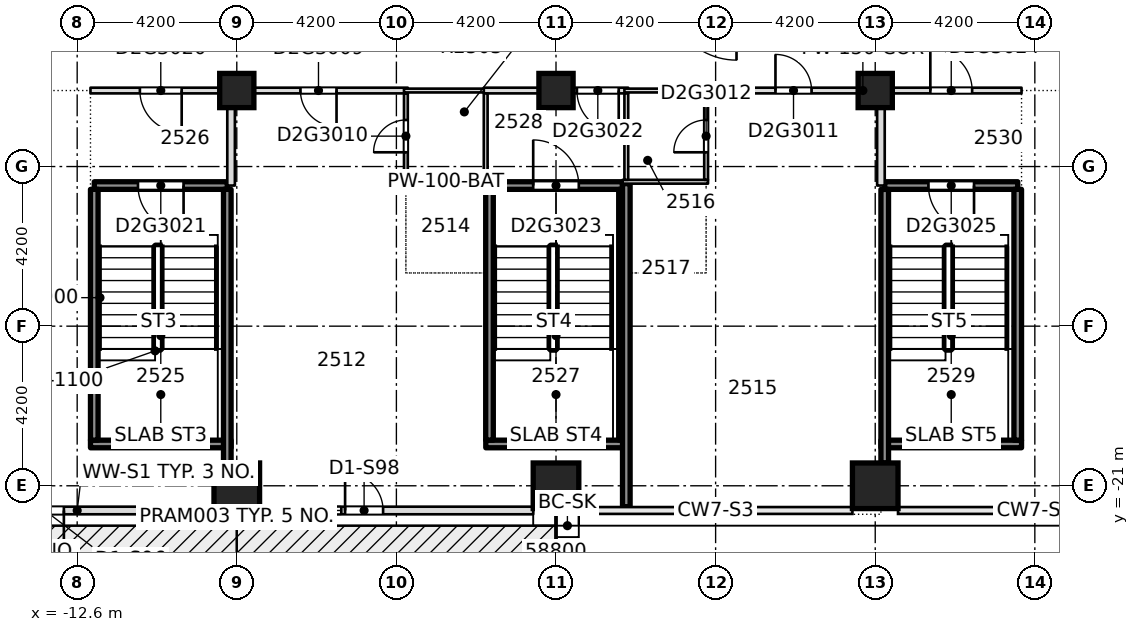
"""IFC4 building model, lengths in metres.
Left out: names, types, materials, properties, quantities, classifications, styles, units other than length and angle.
Written with IfcOpenShell. Run it as: python <this file> out.ifc"""

import sys

from ifc_helpers import new_model, si_unit, direction, frame, frame_2d, origin, origin_2d, place, context, subcontext, project, spatial, rectangle, extrude, element, fill, save


model = new_model("IFC4")
c1 = context("Model", 3, precision=1e-05, world=origin(), true_north=direction((0.0, 1.0)))
c2 = subcontext(c1, "Body", "Model", "MODEL_VIEW")
j1 = project(units=[si_unit("LENGTHUNIT", "METRE"), si_unit("PLANEANGLEUNIT", "RADIAN")], contexts=[c1])
p1 = place(None, origin())
s1 = spatial("IfcSite", under=j1, at=p1, CompositionType="ELEMENT")
p2 = place(p1, origin())
s2 = spatial("IfcBuilding", under=s1, at=p2, CompositionType="ELEMENT")
p3 = place(p2, frame((0.0, 0.0, 101.1)))
s3 = spatial("IfcBuildingStorey", under=s2, at=p3, CompositionType="ELEMENT", Elevation=101.1)
for number, where, z_axis, x_axis in (
    (1, (-8.4, -21.0, -0.32), (0.0, 0.0, 1.0), (1.0, 0.0, 0.0)),
    (2, (0.0, -21.0, -0.32), (0.0, 0.0, 1.0), (1.0, 0.0, 0.0)),
    (3, (8.4, -21.0, -0.32), (0.0, 0.0, 1.0), (1.0, 0.0, 0.0)),
):
    element("IfcColumn", number, at=place(p3, frame(where, z_axis=z_axis, x_axis=x_axis)), inside=s3, PredefinedType="COLUMN", context=c2, shape_type="SweptSolid", body=[
        extrude(rectangle(XDim=1.2, YDim=1.2, at=origin_2d()), origin(), (0.0, 0.0, 1.0), 3.45),
    ])
for number, where, z_axis, x_axis in (
    (4, (-8.4, -10.6, -0.32), (0.0, 0.0, 1.0), (1.0, 0.0, 0.0)),
    (5, (0.0, -10.6, -0.32), (0.0, 0.0, 1.0), (1.0, 0.0, 0.0)),
    (6, (8.4, -10.6, -0.32), (0.0, 0.0, 1.0), (1.0, 0.0, 0.0)),
):
    element("IfcColumn", number, at=place(p3, frame(where, z_axis=z_axis, x_axis=x_axis)), inside=s3, PredefinedType="COLUMN", context=c2, shape_type="SweptSolid", body=[
        extrude(rectangle(XDim=0.9, YDim=0.9, at=origin_2d()), origin(), (0.0, 0.0, 1.0), 3.45),
    ])
p4 = place(p3, frame((-1.848, -19.9, 0.0), z_axis=(0.0, 0.0, 1.0), x_axis=(1.0, 0.0, 0.0)))
e7 = element("IfcWall", 7, at=p4, inside=s3, PredefinedType="SOLIDWALL", context=c2, shape_type="SweptSolid", body=[
    extrude(rectangle(XDim=3.696, YDim=0.2, at=frame_2d((1.848, 0.0))), origin(), (0.0, 0.0, 1.0), 3.13),
])
p5 = place(p3, frame((-12.15, -13.1, 0.0), z_axis=(0.0, 0.0, 1.0), x_axis=(1.0, 0.0, 0.0)))
e8 = element("IfcWall", 8, at=p5, inside=s3, PredefinedType="SOLIDWALL", context=c2, shape_type="SweptSolid", body=[
    extrude(rectangle(XDim=3.5, YDim=0.2, at=frame_2d((1.75, 0.0))), origin(), (0.0, 0.0, 1.0), 3.13),
])
p6 = place(p5, frame((1.15, 0.0, 0.0)))
e9 = element("IfcOpeningElement", 9, at=p6, cuts=e8, PredefinedType="OPENING", context=c2, shape_type="SweptSolid", body=[
    extrude(rectangle(XDim=1.2, YDim=2.1, at=frame_2d((0.6, 1.05))), frame((0.0, 0.11, 0.0), z_axis=(0.0, -1.0, 0.0), x_axis=(1.0, 0.0, 0.0)), (0.0, 0.0, 1.0), 0.22),
])
p7 = place(p3, frame((-1.848, -13.1, 0.0), z_axis=(0.0, 0.0, 1.0), x_axis=(1.0, 0.0, 0.0)))
e10 = element("IfcWall", 10, at=p7, inside=s3, PredefinedType="SOLIDWALL", context=c2, shape_type="SweptSolid", body=[
    extrude(rectangle(XDim=3.596, YDim=0.2, at=frame_2d((1.798, 0.0))), origin(), (0.0, 0.0, 1.0), 3.13),
])
p8 = place(p7, frame((1.248, 0.0, 0.0)))
e11 = element("IfcOpeningElement", 11, at=p8, cuts=e10, PredefinedType="OPENING", context=c2, shape_type="SweptSolid", body=[
    extrude(rectangle(XDim=1.2, YDim=2.1, at=frame_2d((0.6, 1.05))), frame((0.0, 0.11, 0.0), z_axis=(0.0, -1.0, 0.0), x_axis=(1.0, 0.0, 0.0)), (0.0, 0.0, 1.0), 0.22),
])
p9 = place(p3, frame((8.65, -13.1, 0.0), z_axis=(0.0, 0.0, 1.0), x_axis=(1.0, 0.0, 0.0)))
e12 = element("IfcWall", 12, at=p9, inside=s3, PredefinedType="SOLIDWALL", context=c2, shape_type="SweptSolid", body=[
    extrude(rectangle(XDim=3.5, YDim=0.2, at=frame_2d((1.75, 0.0))), origin(), (0.0, 0.0, 1.0), 3.13),
])
p10 = place(p9, frame((1.15, 0.0, 0.0)))
e13 = element("IfcOpeningElement", 13, at=p10, cuts=e12, PredefinedType="OPENING", context=c2, shape_type="SweptSolid", body=[
    extrude(rectangle(XDim=1.2, YDim=2.1, at=frame_2d((0.6, 1.05))), frame((0.0, 0.11, 0.0), z_axis=(0.0, -1.0, 0.0), x_axis=(1.0, 0.0, 0.0)), (0.0, 0.0, 1.0), 0.22),
])
p11 = place(p3, frame((-4.0, -13.0, 0.0), z_axis=(0.0, 0.0, 1.0), x_axis=(1.0, 0.0, 0.0)))
e14 = element("IfcWall", 14, at=p11, inside=s3, PredefinedType="PARTITIONING", context=c2, shape_type="SweptSolid", body=[
    extrude(rectangle(XDim=2.2, YDim=0.1, at=frame_2d((1.1, 0.0))), origin(), (0.0, 0.0, 1.0), 3.13),
])
p12 = place(p3, frame((1.75, -13.0, 0.0), z_axis=(0.0, 0.0, 1.0), x_axis=(1.0, 0.0, 0.0)))
e15 = element("IfcWall", 15, at=p12, inside=s3, PredefinedType="PARTITIONING", context=c2, shape_type="SweptSolid", body=[
    extrude(rectangle(XDim=2.25, YDim=0.1, at=frame_2d((1.125, 0.0))), origin(), (0.0, 0.0, 1.0), 3.13),
])
p13 = place(p3, frame((-12.25, -10.6, 0.0), z_axis=(0.0, 0.0, 1.0), x_axis=(1.0, 0.0, 0.0)))
e16 = element("IfcWall", 16, at=p13, inside=s3, PredefinedType="PARTITIONING", context=c2, shape_type="SweptSolid", body=[
    extrude(rectangle(XDim=8.35, YDim=0.15, at=frame_2d((4.175, 0.0))), origin(), (0.0, 0.0, 1.0), 3.13),
])
p14 = place(p13, frame((5.525, 0.0, 0.0)))
e17 = element("IfcOpeningElement", 17, at=p14, cuts=e16, PredefinedType="OPENING", context=c2, shape_type="SweptSolid", body=[
    extrude(rectangle(XDim=0.95, YDim=2.1, at=frame_2d((0.475, 1.05))), frame((0.0, 0.085, 0.0), z_axis=(0.0, -1.0, 0.0), x_axis=(1.0, 0.0, 0.0)), (0.0, 0.0, 1.0), 0.17),
])
p15 = place(p13, frame((1.3, 0.0, 0.0)))
e18 = element("IfcOpeningElement", 18, at=p15, cuts=e16, PredefinedType="OPENING", context=c2, shape_type="SweptSolid", body=[
    extrude(rectangle(XDim=1.1, YDim=2.1, at=frame_2d((0.55, 1.05))), frame((0.0, 0.085, 0.0), z_axis=(0.0, -1.0, 0.0), x_axis=(1.0, 0.0, 0.0)), (0.0, 0.0, 1.0), 0.17),
])
p16 = place(p3, frame((-4.0, -10.6, 0.0), z_axis=(0.0, 0.0, 1.0), x_axis=(1.0, 0.0, 0.0)))
e19 = element("IfcWall", 19, at=p16, inside=s3, PredefinedType="PARTITIONING", context=c2, shape_type="SweptSolid", body=[
    extrude(rectangle(XDim=2.2, YDim=0.1, at=frame_2d((1.1, 0.0))), origin(), (0.0, 0.0, 1.0), 3.13),
])
p17 = place(p3, frame((-1.9, -10.6, 0.0), z_axis=(0.0, 0.0, 1.0), x_axis=(1.0, 0.0, 0.0)))
e20 = element("IfcWall", 20, at=p17, inside=s3, PredefinedType="PARTITIONING", context=c2, shape_type="SweptSolid", body=[
    extrude(rectangle(XDim=3.8, YDim=0.15, at=frame_2d((1.9, 0.0))), origin(), (0.0, 0.0, 1.0), 3.13),
])
p18 = place(p17, frame((2.45, 0.0, 0.0)))
e21 = element("IfcOpeningElement", 21, at=p18, cuts=e20, PredefinedType="OPENING", context=c2, shape_type="SweptSolid", body=[
    extrude(rectangle(XDim=1.1, YDim=2.1, at=frame_2d((0.55, 1.05))), frame((0.0, 0.085, 0.0), z_axis=(0.0, -1.0, 0.0), x_axis=(1.0, 0.0, 0.0)), (0.0, 0.0, 1.0), 0.17),
])
p19 = place(p3, frame((1.8, -10.6, 0.0), z_axis=(0.0, 0.0, 1.0), x_axis=(1.0, 0.0, 0.0)))
e22 = element("IfcWall", 22, at=p19, inside=s3, PredefinedType="PARTITIONING", context=c2, shape_type="SweptSolid", body=[
    extrude(rectangle(XDim=2.2, YDim=0.1, at=frame_2d((1.1, 0.0))), origin(), (0.0, 0.0, 1.0), 3.13),
])
p20 = place(p3, frame((3.9, -10.6, 0.0), z_axis=(0.0, 0.0, 1.0), x_axis=(1.0, 0.0, 0.0)))
e23 = element("IfcWall", 23, at=p20, inside=s3, PredefinedType="PARTITIONING", context=c2, shape_type="SweptSolid", body=[
    extrude(rectangle(XDim=8.35, YDim=0.15, at=frame_2d((4.175, 0.0))), origin(), (0.0, 0.0, 1.0), 3.13),
])
p21 = place(p20, frame((1.875, 0.0, 0.0)))
e24 = element("IfcOpeningElement", 24, at=p21, cuts=e23, PredefinedType="OPENING", context=c2, shape_type="SweptSolid", body=[
    extrude(rectangle(XDim=0.95, YDim=2.1, at=frame_2d((0.475, 1.05))), frame((0.0, 0.085, 0.0), z_axis=(0.0, -1.0, 0.0), x_axis=(1.0, 0.0, 0.0)), (0.0, 0.0, 1.0), 0.17),
])
p22 = place(p20, frame((5.95, 0.0, 0.0)))
e25 = element("IfcOpeningElement", 25, at=p22, cuts=e23, PredefinedType="OPENING", context=c2, shape_type="SweptSolid", body=[
    extrude(rectangle(XDim=1.1, YDim=2.1, at=frame_2d((0.55, 1.05))), frame((0.0, 0.085, 0.0), z_axis=(0.0, -1.0, 0.0), x_axis=(1.0, 0.0, 0.0)), (0.0, 0.0, 1.0), 0.17),
])
p23 = place(p3, frame((-8.55, -13.1, 0.0), z_axis=(0.0, 0.0, 1.0), x_axis=(0.0, 1.0, 0.0)))
e26 = element("IfcWall", 26, at=p23, inside=s3, PredefinedType="PARTITIONING", context=c2, shape_type="SweptSolid", body=[
    extrude(rectangle(XDim=2.425, YDim=0.2, at=frame_2d((1.212, 0.0))), origin(), (0.0, 0.0, 1.0), 3.13),
])
p24 = place(p3, frame((-3.95, -12.95, 0.0), z_axis=(0.0, 0.0, 1.0), x_axis=(0.0, 1.0, 0.0)))
e27 = element("IfcWall", 27, at=p24, inside=s3, PredefinedType="PARTITIONING", context=c2, shape_type="SweptSolid", body=[
    extrude(rectangle(XDim=2.275, YDim=0.1, at=frame_2d((1.137, 0.0))), origin(), (0.0, 0.0, 1.0), 3.13),
])
p25 = place(p24, frame((0.725, 0.0, 0.0)))
e28 = element("IfcOpeningElement", 28, at=p25, cuts=e27, PredefinedType="OPENING", context=c2, shape_type="SweptSolid", body=[
    extrude(rectangle(XDim=0.85, YDim=2.1, at=frame_2d((0.425, 1.05))), frame((0.0, 0.06, 0.0), z_axis=(0.0, -1.0, 0.0), x_axis=(1.0, 0.0, 0.0)), (0.0, 0.0, 1.0), 0.12),
])
p26 = place(p3, frame((-1.85, -12.95, 0.0), z_axis=(0.0, 0.0, 1.0), x_axis=(0.0, 1.0, 0.0)))
e29 = element("IfcWall", 29, at=p26, inside=s3, PredefinedType="PARTITIONING", context=c2, shape_type="SweptSolid", body=[
    extrude(rectangle(XDim=2.275, YDim=0.1, at=frame_2d((1.137, 0.0))), origin(), (0.0, 0.0, 1.0), 3.13),
])
for number, where, z_axis, x_axis in (
    (30, (-1.75, -19.798, 0.0), (0.0, 0.0, 1.0), (0.0, 1.0, 0.0)),
    (31, (1.75, -19.798, 0.0), (0.0, 0.0, 1.0), (0.0, 1.0, 0.0)),
):
    element("IfcWall", number, at=place(p3, frame(where, z_axis=z_axis, x_axis=x_axis)), inside=s3, PredefinedType="SOLIDWALL", context=c2, shape_type="SweptSolid", body=[
        extrude(rectangle(XDim=6.596, YDim=0.2, at=frame_2d((3.298, 0.0))), origin(), (0.0, 0.0, 1.0), 3.13),
    ])
p27 = place(p3, frame((1.85, -12.95, 0.0), z_axis=(0.0, 0.0, 1.0), x_axis=(0.0, 1.0, 0.0)))
e32 = element("IfcWall", 32, at=p27, inside=s3, PredefinedType="PARTITIONING", context=c2, shape_type="SweptSolid", body=[
    extrude(rectangle(XDim=2.275, YDim=0.1, at=frame_2d((1.137, 0.0))), origin(), (0.0, 0.0, 1.0), 3.13),
])
p28 = place(p3, frame((3.95, -12.95, 0.0), z_axis=(0.0, 0.0, 1.0), x_axis=(0.0, 1.0, 0.0)))
e33 = element("IfcWall", 33, at=p28, inside=s3, PredefinedType="PARTITIONING", context=c2, shape_type="SweptSolid", body=[
    extrude(rectangle(XDim=2.275, YDim=0.1, at=frame_2d((1.137, 0.0))), origin(), (0.0, 0.0, 1.0), 3.13),
])
p29 = place(p28, frame((0.725, 0.0, 0.0)))
e34 = element("IfcOpeningElement", 34, at=p29, cuts=e33, PredefinedType="OPENING", context=c2, shape_type="SweptSolid", body=[
    extrude(rectangle(XDim=0.85, YDim=2.1, at=frame_2d((0.425, 1.05))), frame((0.0, 0.06, 0.0), z_axis=(0.0, -1.0, 0.0), x_axis=(1.0, 0.0, 0.0)), (0.0, 0.0, 1.0), 0.12),
])
p30 = place(p3, frame((8.55, -13.1, 0.0), z_axis=(0.0, 0.0, 1.0), x_axis=(0.0, 1.0, 0.0)))
e35 = element("IfcWall", 35, at=p30, inside=s3, PredefinedType="PARTITIONING", context=c2, shape_type="SweptSolid", body=[
    extrude(rectangle(XDim=2.425, YDim=0.2, at=frame_2d((1.212, 0.0))), origin(), (0.0, 0.0, 1.0), 3.13),
])
p31 = place(p3, frame((-16.2, -21.65, 0.0), z_axis=(0.0, 0.0, 1.0), x_axis=(1.0, 0.0, 0.0)))
e36 = element("IfcWall", 36, at=p31, inside=s3, PredefinedType="STANDARD", context=c2, shape_type="SweptSolid", body=[
    extrude(rectangle(XDim=7.2, YDim=0.2, at=frame_2d((3.6, 0.0))), origin(), (0.0, 0.0, 1.0), 3.13),
])
p32 = place(p31, frame((0.35, 0.0, 0.2)))
e37 = element("IfcOpeningElement", 37, at=p32, cuts=e36, PredefinedType="OPENING", context=c2, shape_type="SweptSolid", body=[
    extrude(rectangle(XDim=1.8, YDim=2.65, at=frame_2d((0.9, 1.325))), frame((0.0, 0.11, 0.0), z_axis=(0.0, -1.0, 0.0), x_axis=(1.0, 0.0, 0.0)), (0.0, 0.0, 1.0), 0.22),
])
p33 = place(p31, frame((2.25, 0.0, 0.0)))
e38 = element("IfcOpeningElement", 38, at=p33, cuts=e36, PredefinedType="OPENING", context=c2, shape_type="SweptSolid", body=[
    extrude(rectangle(XDim=1.0, YDim=2.4, at=frame_2d((0.5, 1.2))), frame((0.0, 0.11, 0.0), z_axis=(0.0, -1.0, 0.0), x_axis=(1.0, 0.0, 0.0)), (0.0, 0.0, 1.0), 0.22),
])
p34 = place(p3, frame((-7.8, -21.65, 0.0), z_axis=(0.0, 0.0, 1.0), x_axis=(1.0, 0.0, 0.0)))
e39 = element("IfcWall", 39, at=p34, inside=s3, PredefinedType="STANDARD", context=c2, shape_type="SweptSolid", body=[
    extrude(rectangle(XDim=7.2, YDim=0.2, at=frame_2d((3.6, 0.0))), origin(), (0.0, 0.0, 1.0), 3.13),
])
p35 = place(p34, frame((0.35, 0.0, 0.2)))
e40 = element("IfcOpeningElement", 40, at=p35, cuts=e39, PredefinedType="OPENING", context=c2, shape_type="SweptSolid", body=[
    extrude(rectangle(XDim=1.8, YDim=2.65, at=frame_2d((0.9, 1.325))), frame((0.0, 0.11, 0.0), z_axis=(0.0, -1.0, 0.0), x_axis=(1.0, 0.0, 0.0)), (0.0, 0.0, 1.0), 0.22),
])
p36 = place(p34, frame((2.25, 0.0, 0.0)))
e41 = element("IfcOpeningElement", 41, at=p36, cuts=e39, PredefinedType="OPENING", context=c2, shape_type="SweptSolid", body=[
    extrude(rectangle(XDim=1.0, YDim=2.4, at=frame_2d((0.5, 1.2))), frame((0.0, 0.11, 0.0), z_axis=(0.0, -1.0, 0.0), x_axis=(1.0, 0.0, 0.0)), (0.0, 0.0, 1.0), 0.22),
])
p37 = place(p3, frame((-12.25, -19.9, 0.0), z_axis=(0.0, 0.0, 1.0), x_axis=(1.0, 0.0, 0.0)))
e42 = element("IfcWall", 42, at=p37, inside=s3, PredefinedType="SOLIDWALL", context=c2, shape_type="SweptSolid", body=[
    extrude(rectangle(XDim=3.7, YDim=0.2, at=frame_2d((1.85, 0.0))), origin(), (0.0, 0.0, 1.0), 3.13),
])
p38 = place(p3, frame((-12.15, -19.8, 0.0), z_axis=(0.0, 0.0, 1.0), x_axis=(0.0, 1.0, 0.0)))
e43 = element("IfcWall", 43, at=p38, inside=s3, PredefinedType="SOLIDWALL", context=c2, shape_type="SweptSolid", body=[
    extrude(rectangle(XDim=6.6, YDim=0.2, at=frame_2d((3.3, 0.0))), origin(), (0.0, 0.0, 1.0), 3.13),
])
p39 = place(p3, frame((-8.65, -20.4, 0.0), z_axis=(0.0, 0.0, 1.0), x_axis=(0.0, 1.0, 0.0)))
e44 = element("IfcWall", 44, at=p39, inside=s3, PredefinedType="SOLIDWALL", context=c2, shape_type="SweptSolid", body=[
    extrude(rectangle(XDim=7.2, YDim=0.2, at=frame_2d((3.6, 0.0))), origin(), (0.0, 0.0, 1.0), 3.13),
])
p40 = place(p3, frame((8.55, -19.9, 0.0), z_axis=(0.0, 0.0, 1.0), x_axis=(1.0, 0.0, 0.0)))
e45 = element("IfcWall", 45, at=p40, inside=s3, PredefinedType="SOLIDWALL", context=c2, shape_type="SweptSolid", body=[
    extrude(rectangle(XDim=3.7, YDim=0.2, at=frame_2d((1.85, 0.0))), origin(), (0.0, 0.0, 1.0), 3.13),
])
p41 = place(p3, frame((12.15, -19.8, 0.0), z_axis=(0.0, 0.0, 1.0), x_axis=(0.0, 1.0, 0.0)))
e46 = element("IfcWall", 46, at=p41, inside=s3, PredefinedType="SOLIDWALL", context=c2, shape_type="SweptSolid", body=[
    extrude(rectangle(XDim=6.6, YDim=0.2, at=frame_2d((3.3, 0.0))), origin(), (0.0, 0.0, 1.0), 3.13),
])
p42 = place(p3, frame((1.85, -21.55, 0.0), z_axis=(0.0, 0.0, 1.0), x_axis=(0.0, 1.0, 0.0)))
e47 = element("IfcWall", 47, at=p42, inside=s3, PredefinedType="SOLIDWALL", context=c2, shape_type="SweptSolid", body=[
    extrude(rectangle(XDim=8.5, YDim=0.2, at=frame_2d((4.25, 0.0))), origin(), (0.0, 0.0, 1.0), 3.13),
])
p43 = place(p3, frame((8.65, -20.4, 0.0), z_axis=(0.0, 0.0, 1.0), x_axis=(0.0, 1.0, 0.0)))
e48 = element("IfcWall", 48, at=p43, inside=s3, PredefinedType="SOLIDWALL", context=c2, shape_type="SweptSolid", body=[
    extrude(rectangle(XDim=7.198, YDim=0.2, at=frame_2d((3.599, 0.0))), origin(), (0.0, 0.0, 1.0), 3.13),
])
p44 = place(p14, origin())
e49 = element("IfcDoor", 49, at=p44, inside=s3, OperationType="SINGLE_SWING_LEFT", PredefinedType="DOOR", context=c2, shape_type="SweptSolid", body=[
    extrude(rectangle(XDim=0.95, YDim=2.1, at=frame_2d((0.475, 1.05))), frame((0.0, 0.025, 0.0), z_axis=(0.0, -1.0, 0.0), x_axis=(1.0, 0.0, 0.0)), (0.0, 0.0, 1.0), 0.05),
])
fill(e17, e49)
p45 = place(p25, origin())
e50 = element("IfcDoor", 50, at=p45, inside=s3, OperationType="SINGLE_SWING_RIGHT", PredefinedType="DOOR", context=c2, shape_type="SweptSolid", body=[
    extrude(rectangle(XDim=0.85, YDim=2.1, at=frame_2d((0.425, 1.05))), frame((0.0, 0.025, 0.0), z_axis=(0.0, -1.0, 0.0), x_axis=(1.0, 0.0, 0.0)), (0.0, 0.0, 1.0), 0.05),
])
fill(e28, e50)
p46 = place(p21, origin())
e51 = element("IfcDoor", 51, at=p46, inside=s3, OperationType="SINGLE_SWING_LEFT", PredefinedType="DOOR", context=c2, shape_type="SweptSolid", body=[
    extrude(rectangle(XDim=0.95, YDim=2.1, at=frame_2d((0.475, 1.05))), frame((0.0, 0.025, 0.0), z_axis=(0.0, -1.0, 0.0), x_axis=(1.0, 0.0, 0.0)), (0.0, 0.0, 1.0), 0.05),
])
fill(e24, e51)
p47 = place(p29, origin())
e52 = element("IfcDoor", 52, at=p47, inside=s3, OperationType="SINGLE_SWING_LEFT", PredefinedType="DOOR", context=c2, shape_type="SweptSolid", body=[
    extrude(rectangle(XDim=0.85, YDim=2.1, at=frame_2d((0.425, 1.05))), frame((0.0, 0.025, 0.0), z_axis=(0.0, -1.0, 0.0), x_axis=(1.0, 0.0, 0.0)), (0.0, 0.0, 1.0), 0.05),
])
fill(e34, e52)
p48 = place(p15, origin())
e53 = element("IfcDoor", 53, at=p48, inside=s3, OperationType="SINGLE_SWING_RIGHT", PredefinedType="DOOR", context=c2, shape_type="SweptSolid", body=[
    extrude(rectangle(XDim=1.1, YDim=2.1, at=frame_2d((0.55, 1.05))), frame((0.0, 0.025, 0.0), z_axis=(0.0, -1.0, 0.0), x_axis=(1.0, 0.0, 0.0)), (0.0, 0.0, 1.0), 0.05),
])
fill(e18, e53)
p49 = place(p6, origin())
e54 = element("IfcDoor", 54, at=p49, inside=s3, OperationType="SINGLE_SWING_RIGHT", PredefinedType="DOOR", context=c2, shape_type="SweptSolid", body=[
    extrude(rectangle(XDim=1.2, YDim=2.1, at=frame_2d((0.6, 1.05))), frame((0.0, 0.025, 0.0), z_axis=(0.0, -1.0, 0.0), x_axis=(1.0, 0.0, 0.0)), (0.0, 0.0, 1.0), 0.05),
])
fill(e9, e54)
p50 = place(p18, origin())
e55 = element("IfcDoor", 55, at=p50, inside=s3, OperationType="SINGLE_SWING_LEFT", PredefinedType="DOOR", context=c2, shape_type="SweptSolid", body=[
    extrude(rectangle(XDim=1.1, YDim=2.1, at=frame_2d((0.55, 1.05))), frame((0.0, 0.025, 0.0), z_axis=(0.0, -1.0, 0.0), x_axis=(1.0, 0.0, 0.0)), (0.0, 0.0, 1.0), 0.05),
])
fill(e21, e55)
p51 = place(p8, origin())
e56 = element("IfcDoor", 56, at=p51, inside=s3, OperationType="SINGLE_SWING_RIGHT", PredefinedType="DOOR", context=c2, shape_type="SweptSolid", body=[
    extrude(rectangle(XDim=1.2, YDim=2.1, at=frame_2d((0.6, 1.05))), frame((0.0, 0.025, 0.0), z_axis=(0.0, -1.0, 0.0), x_axis=(1.0, 0.0, 0.0)), (0.0, 0.0, 1.0), 0.05),
])
fill(e11, e56)
p52 = place(p22, origin())
e57 = element("IfcDoor", 57, at=p52, inside=s3, OperationType="SINGLE_SWING_LEFT", PredefinedType="DOOR", context=c2, shape_type="SweptSolid", body=[
    extrude(rectangle(XDim=1.1, YDim=2.1, at=frame_2d((0.55, 1.05))), frame((0.0, 0.025, 0.0), z_axis=(0.0, -1.0, 0.0), x_axis=(1.0, 0.0, 0.0)), (0.0, 0.0, 1.0), 0.05),
])
fill(e25, e57)
p53 = place(p10, origin())
e58 = element("IfcDoor", 58, at=p53, inside=s3, OperationType="SINGLE_SWING_RIGHT", PredefinedType="DOOR", context=c2, shape_type="SweptSolid", body=[
    extrude(rectangle(XDim=1.2, YDim=2.1, at=frame_2d((0.6, 1.05))), frame((0.0, 0.025, 0.0), z_axis=(0.0, -1.0, 0.0), x_axis=(1.0, 0.0, 0.0)), (0.0, 0.0, 1.0), 0.05),
])
fill(e13, e58)
p54 = place(p33, origin())
e59 = element("IfcDoor", 59, at=p54, inside=s3, OperationType="SINGLE_SWING_LEFT", PredefinedType="DOOR", context=c2, shape_type="SweptSolid", body=[
    extrude(rectangle(XDim=1.0, YDim=2.4, at=frame_2d((0.5, 1.2))), frame((0.0, 0.025, 0.0), z_axis=(0.0, -1.0, 0.0), x_axis=(1.0, 0.0, 0.0)), (0.0, 0.0, 1.0), 0.05),
])
fill(e38, e59)
p55 = place(p35, origin())
e60 = element("IfcWindow", 60, at=p55, inside=s3, PartitioningType="SINGLE_PANEL", PredefinedType="WINDOW", context=c2, shape_type="SweptSolid", body=[
    extrude(rectangle(XDim=1.8, YDim=2.65, at=frame_2d((0.9, 1.325))), frame((0.0, 0.03, 0.0), z_axis=(0.0, -1.0, 0.0), x_axis=(1.0, 0.0, 0.0)), (0.0, 0.0, 1.0), 0.06),
])
fill(e40, e60)
p56 = place(p36, origin())
e61 = element("IfcDoor", 61, at=p56, inside=s3, OperationType="SINGLE_SWING_LEFT", PredefinedType="DOOR", context=c2, shape_type="SweptSolid", body=[
    extrude(rectangle(XDim=1.0, YDim=2.4, at=frame_2d((0.5, 1.2))), frame((0.0, 0.025, 0.0), z_axis=(0.0, -1.0, 0.0), x_axis=(1.0, 0.0, 0.0)), (0.0, 0.0, 1.0), 0.05),
])
fill(e41, e61)
save(model, sys.argv[1])
